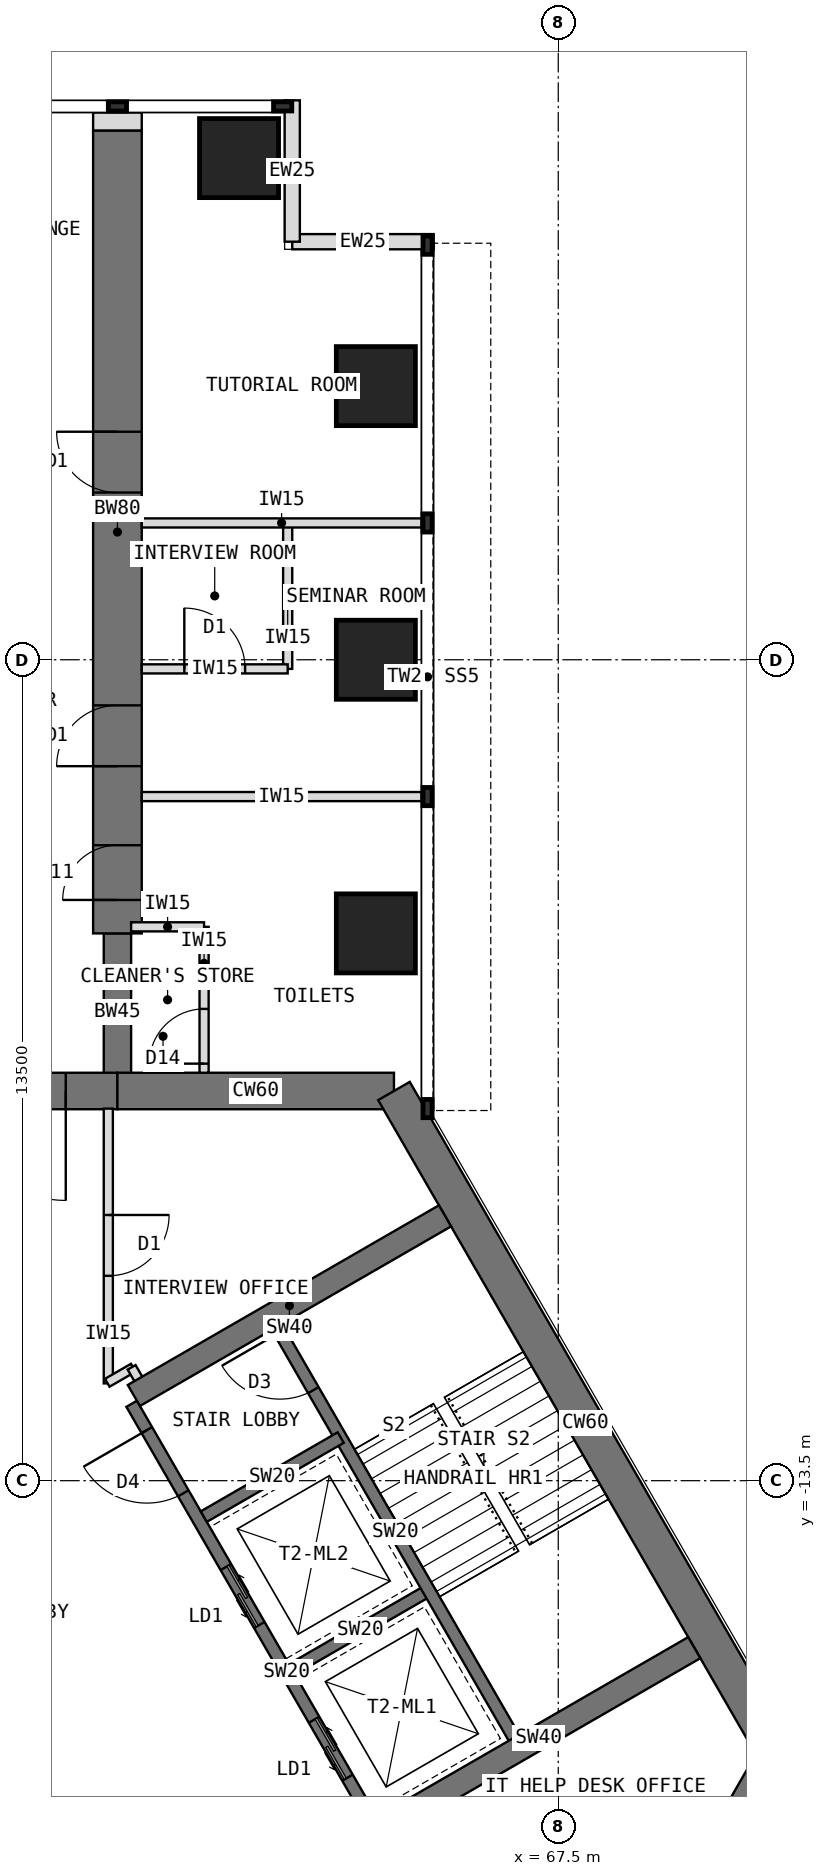
"""IFC4 building model, lengths in metres.
Left out: names, types, materials, properties, quantities, classifications, styles, units other than length and angle.
Written with IfcOpenShell. Run it as: python <this file> out.ifc"""

import sys

from ifc_helpers import new_model, si_unit, direction, frame, frame_2d, origin, origin_2d, place, context, subcontext, project, spatial, rectangle, extrude, element, fill, save


model = new_model("IFC4")
c1 = context("Model", 3, precision=1e-05, world=origin(), true_north=direction((0.0, 1.0)))
c2 = subcontext(c1, "Body", "Model", "MODEL_VIEW")
j1 = project(units=[si_unit("LENGTHUNIT", "METRE"), si_unit("PLANEANGLEUNIT", "RADIAN")], contexts=[c1])
p1 = place(None, origin())
s1 = spatial("IfcSite", under=j1, at=p1, CompositionType="ELEMENT")
p2 = place(p1, origin())
s2 = spatial("IfcBuilding", under=s1, at=p2, CompositionType="ELEMENT")
p3 = place(p2, frame((0.0, 0.0, 121.5)))
s3 = spatial("IfcBuildingStorey", under=s2, at=p3, CompositionType="ELEMENT", Elevation=121.5)
p4 = place(p3, frame((64.798, -7.092, 0.0), z_axis=(0.0, 0.0, 1.0), x_axis=(-1.0, 0.0, 0.0)))
e1 = element("IfcWall", 1, at=p4, inside=s3, PredefinedType="SHEAR", context=c2, shape_type="SweptSolid", body=[
    extrude(rectangle(XDim=4.548, YDim=0.6, at=frame_2d((2.274, 0.0))), origin(), (0.0, 0.0, 1.0), 4.0),
])
p5 = place(p3, frame((60.25, -7.092, 0.0), z_axis=(0.0, 0.0, 1.0), x_axis=(-1.0, 0.0, 0.0)))
e2 = element("IfcWall", 2, at=p5, inside=s3, PredefinedType="SHEAR", context=c2, shape_type="SweptSolid", body=[
    extrude(rectangle(XDim=3.5, YDim=0.6, at=frame_2d((1.75, 0.0))), origin(), (0.0, 0.0, 1.0), 4.0),
])
p6 = place(p5, frame((0.85, 0.0, 0.0)))
e3 = element("IfcOpeningElement", 3, at=p6, cuts=e2, PredefinedType="OPENING", context=c2, shape_type="SweptSolid", body=[
    extrude(rectangle(XDim=1.8, YDim=2.1, at=frame_2d((0.9, 1.05))), frame((0.0, 0.31, 0.0), z_axis=(0.0, -1.0, 0.0), x_axis=(1.0, 0.0, 0.0)), (0.0, 0.0, 1.0), 0.62),
])
p7 = place(p3, frame((68.822, -21.939, 0.0), z_axis=(0.0, 0.0, 1.0), x_axis=(0.500024481964, 0.866011268655, 0.0)))
e4 = element("IfcWall", 4, at=p7, inside=s3, PredefinedType="SHEAR", context=c2, shape_type="SweptSolid", body=[
    extrude(rectangle(XDim=4.548, YDim=0.6, at=frame_2d((2.274, 0.0))), origin(), (0.0, 0.0, 1.0), 4.0),
])
p8 = place(p3, frame((71.096, -18.0, 0.0), z_axis=(0.0, 0.0, 1.0), x_axis=(-0.500005998175, 0.866021940709, 0.0)))
e5 = element("IfcWall", 5, at=p8, inside=s3, PredefinedType="SHEAR", context=c2, shape_type="SweptSolid", body=[
    extrude(rectangle(XDim=12.596, YDim=0.6, at=frame_2d((6.298, 0.0))), origin(), (0.0, 0.0, 1.0), 4.0),
])
p9 = place(p3, frame((60.25, -7.092, 0.0), z_axis=(0.0, 0.0, 1.0), x_axis=(0.0, 1.0, 0.0)))
e6 = element("IfcWall", 6, at=p9, inside=s3, PredefinedType="SHEAR", context=c2, shape_type="SweptSolid", body=[
    extrude(rectangle(XDim=2.592, YDim=0.45, at=frame_2d((1.296, 0.0))), origin(), (0.0, 0.0, 1.0), 4.0),
])
p10 = place(p3, frame((60.25, -4.5, 0.0), z_axis=(0.0, 0.0, 1.0), x_axis=(0.0, 1.0, 0.0)))
e7 = element("IfcWall", 7, at=p10, inside=s3, PredefinedType="SHEAR", context=c2, shape_type="SweptSolid", body=[
    extrude(rectangle(XDim=13.2, YDim=0.8, at=frame_2d((6.6, 0.0))), origin(), (0.0, 0.0, 1.0), 4.0),
])
p11 = place(p10, frame((0.55, 0.0, 0.0)))
e8 = element("IfcOpeningElement", 8, at=p11, cuts=e7, PredefinedType="OPENING", context=c2, shape_type="SweptSolid", body=[
    extrude(rectangle(XDim=0.9, YDim=2.1, at=frame_2d((0.45, 1.05))), frame((0.0, 0.41, 0.0), z_axis=(0.0, -1.0, 0.0), x_axis=(1.0, 0.0, 0.0)), (0.0, 0.0, 1.0), 0.82),
])
p12 = place(p10, frame((2.75, 0.0, 0.0)))
e9 = element("IfcOpeningElement", 9, at=p12, cuts=e7, PredefinedType="OPENING", context=c2, shape_type="SweptSolid", body=[
    extrude(rectangle(XDim=1.0, YDim=2.1, at=frame_2d((0.5, 1.05))), frame((0.0, 0.41, 0.0), z_axis=(0.0, -1.0, 0.0), x_axis=(1.0, 0.0, 0.0)), (0.0, 0.0, 1.0), 0.82),
])
p13 = place(p10, frame((7.25, 0.0, 0.0)))
e10 = element("IfcOpeningElement", 10, at=p13, cuts=e7, PredefinedType="OPENING", context=c2, shape_type="SweptSolid", body=[
    extrude(rectangle(XDim=1.0, YDim=2.1, at=frame_2d((0.5, 1.05))), frame((0.0, 0.41, 0.0), z_axis=(0.0, -1.0, 0.0), x_axis=(1.0, 0.0, 0.0)), (0.0, 0.0, 1.0), 0.82),
])
for number, where, z_axis, x_axis in (
    (11, (64.5, -4.5, 0.0), (0.0, 0.0, 1.0), (1.0, 0.0, 0.0)),
    (12, (64.5, 0.0, 0.0), (0.0, 0.0, 1.0), (1.0, 0.0, 0.0)),
    (13, (64.5, 4.5, 0.0), (0.0, 0.0, 1.0), (1.0, 0.0, 0.0)),
    (14, (62.25, 8.25, 0.0), (0.0, 0.0, 1.0), (1.0, 0.0, 0.0)),
):
    element("IfcColumn", number, at=place(p3, frame(where, z_axis=z_axis, x_axis=x_axis)), inside=s3, PredefinedType="COLUMN", context=c2, shape_type="SweptSolid", body=[
        extrude(rectangle(XDim=1.3, YDim=1.3, at=origin_2d()), origin(), (0.0, 0.0, 1.0), 4.0),
    ])
for number, where, z_axis, x_axis in (
    (15, (65.45, 6.875, 0.0), (0.0, 0.0, 1.0), (-1.0, 0.0, 0.0)),
    (16, (63.125, 6.875, 0.0), (0.0, 0.0, 1.0), (0.0, 1.0, 0.0)),
):
    element("IfcWall", number, at=place(p3, frame(where, z_axis=z_axis, x_axis=x_axis)), inside=s3, PredefinedType="STANDARD", context=c2, shape_type="SweptSolid", body=[
        extrude(rectangle(XDim=2.325, YDim=0.25, at=frame_2d((1.163, 0.0))), origin(), (0.0, 0.0, 1.0), 3.8),
    ])
p14 = place(p3, frame((60.25, 8.7, 0.0), z_axis=(0.0, 0.0, 1.0), x_axis=(0.0, 1.0, 0.0)))
e17 = element("IfcWall", 17, at=p14, inside=s3, PredefinedType="PARTITIONING", context=c2, shape_type="SweptSolid", body=[
    extrude(rectangle(XDim=0.3, YDim=0.8, at=frame_2d((0.15, 0.0))), origin(), (0.0, 0.0, 1.0), 3.8),
])
p15 = place(p3, frame((64.484, -19.164, 0.0), z_axis=(0.0, 0.0, 1.0), x_axis=(-0.49999894854, 0.866026010844, 0.0)))
e18 = element("IfcWall", 18, at=p15, inside=s3, PredefinedType="SHEAR", context=c2, shape_type="SweptSolid", body=[
    extrude(rectangle(XDim=8.0, YDim=0.2, at=frame_2d((4.0, 0.0))), origin(), (0.0, 0.0, 1.0), 4.0),
])
p16 = place(p15, frame((6.3, 0.0, 0.0)))
e19 = element("IfcOpeningElement", 19, at=p16, cuts=e18, PredefinedType="OPENING", context=c2, shape_type="SweptSolid", body=[
    extrude(rectangle(XDim=1.2, YDim=2.1, at=frame_2d((0.6, 1.05))), frame((0.0, 0.11, 0.0), z_axis=(0.0, -1.0, 0.0), x_axis=(1.0, 0.0, 0.0)), (0.0, 0.0, 1.0), 0.22),
])
p17 = place(p15, frame((0.9, 0.0, 0.0)))
e20 = element("IfcOpeningElement", 20, at=p17, cuts=e18, PredefinedType="OPENING", context=c2, shape_type="SweptSolid", body=[
    extrude(rectangle(XDim=1.1, YDim=2.2, at=frame_2d((0.55, 1.1))), frame((0.0, 0.11, 0.0), z_axis=(0.0, -1.0, 0.0), x_axis=(1.0, 0.0, 0.0)), (0.0, 0.0, 1.0), 0.22),
])
p18 = place(p15, frame((3.8, 0.0, 0.0)))
e21 = element("IfcOpeningElement", 21, at=p18, cuts=e18, PredefinedType="OPENING", context=c2, shape_type="SweptSolid", body=[
    extrude(rectangle(XDim=1.1, YDim=2.2, at=frame_2d((0.55, 1.1))), frame((0.0, 0.11, 0.0), z_axis=(0.0, -1.0, 0.0), x_axis=(1.0, 0.0, 0.0)), (0.0, 0.0, 1.0), 0.22),
])
p19 = place(p3, frame((63.12, -16.603, 0.0), z_axis=(0.0, 0.0, 1.0), x_axis=(0.866062058628, 0.499936506574, 0.0)))
e22 = element("IfcWall", 22, at=p19, inside=s3, PredefinedType="SHEAR", context=c2, shape_type="SweptSolid", body=[
    extrude(rectangle(XDim=2.6, YDim=0.2, at=frame_2d((1.3, 0.0))), origin(), (0.0, 0.0, 1.0), 4.0),
])
p20 = place(p3, frame((61.67, -14.091, 0.0), z_axis=(0.0, 0.0, 1.0), x_axis=(0.86603858612, 0.49997716683, 0.0)))
e23 = element("IfcWall", 23, at=p20, inside=s3, PredefinedType="SHEAR", context=c2, shape_type="SweptSolid", body=[
    extrude(rectangle(XDim=2.6, YDim=0.2, at=frame_2d((1.3, 0.0))), origin(), (0.0, 0.0, 1.0), 4.0),
])
p21 = place(p3, frame((66.822, -17.814, 0.0), z_axis=(0.0, 0.0, 1.0), x_axis=(-0.49999894854, 0.866026010844, 0.0)))
e24 = element("IfcWall", 24, at=p21, inside=s3, PredefinedType="SHEAR", context=c2, shape_type="SweptSolid", body=[
    extrude(rectangle(XDim=8.0, YDim=0.2, at=frame_2d((4.0, 0.0))), origin(), (0.0, 0.0, 1.0), 4.0),
])
p22 = place(p21, frame((6.7, 0.0, 0.0)))
e25 = element("IfcOpeningElement", 25, at=p22, cuts=e24, PredefinedType="OPENING", context=c2, shape_type="SweptSolid", body=[
    extrude(rectangle(XDim=1.1, YDim=2.1, at=frame_2d((0.55, 1.05))), frame((0.0, 0.11, 0.0), z_axis=(0.0, -1.0, 0.0), x_axis=(1.0, 0.0, 0.0)), (0.0, 0.0, 1.0), 0.22),
])
p23 = place(p3, frame((60.52, -12.099, 0.0), z_axis=(0.0, 0.0, 1.0), x_axis=(0.866009424208, 0.500027676417, 0.0)))
e26 = element("IfcWall", 26, at=p23, inside=s3, PredefinedType="SHEAR", context=c2, shape_type="SweptSolid", body=[
    extrude(rectangle(XDim=5.908, YDim=0.4, at=frame_2d((2.954, 0.0))), origin(), (0.0, 0.0, 1.0), 4.0),
])
p24 = place(p3, frame((64.62, -19.201, 0.0), z_axis=(0.0, 0.0, 1.0), x_axis=(0.866027317282, 0.49999668571, 0.0)))
e27 = element("IfcWall", 27, at=p24, inside=s3, PredefinedType="SHEAR", context=c2, shape_type="SweptSolid", body=[
    extrude(rectangle(XDim=5.908, YDim=0.4, at=frame_2d((2.954, 0.0))), origin(), (0.0, 0.0, 1.0), 4.0),
])
for number, where, z_axis, x_axis in (
    (28, (60.65, -2.25, 0.0), (0.0, 0.0, 1.0), (1.0, 0.0, 0.0)),
    (29, (60.65, 2.25, 0.0), (0.0, 0.0, 1.0), (1.0, 0.0, 0.0)),
):
    element("IfcWall", number, at=place(p3, frame(where, z_axis=z_axis, x_axis=x_axis)), inside=s3, PredefinedType="PARTITIONING", context=c2, shape_type="SweptSolid", body=[
        extrude(rectangle(XDim=4.6, YDim=0.15, at=frame_2d((2.3, 0.0))), origin(), (0.0, 0.0, 1.0), 3.8),
    ])
p25 = place(p3, frame((63.05, -0.15, 0.0), z_axis=(0.0, 0.0, 1.0), x_axis=(0.0, 1.0, 0.0)))
e30 = element("IfcWall", 30, at=p25, inside=s3, PredefinedType="PARTITIONING", context=c2, shape_type="SweptSolid", body=[
    extrude(rectangle(XDim=2.4, YDim=0.15, at=frame_2d((1.2, 0.0))), origin(), (0.0, 0.0, 1.0), 3.8),
])
p26 = place(p3, frame((60.65, -0.15, 0.0), z_axis=(0.0, 0.0, 1.0), x_axis=(1.0, 0.0, 0.0)))
e31 = element("IfcWall", 31, at=p26, inside=s3, PredefinedType="PARTITIONING", context=c2, shape_type="SweptSolid", body=[
    extrude(rectangle(XDim=2.4, YDim=0.15, at=frame_2d((1.2, 0.0))), origin(), (0.0, 0.0, 1.0), 3.8),
])
p27 = place(p26, frame((0.7, 0.0, 0.0)))
e32 = element("IfcOpeningElement", 32, at=p27, cuts=e31, PredefinedType="OPENING", context=c2, shape_type="SweptSolid", body=[
    extrude(rectangle(XDim=1.0, YDim=2.1, at=frame_2d((0.5, 1.05))), frame((0.0, 0.085, 0.0), z_axis=(0.0, -1.0, 0.0), x_axis=(1.0, 0.0, 0.0)), (0.0, 0.0, 1.0), 0.17),
])
p28 = place(p3, frame((61.675, -6.792, 0.0), z_axis=(0.0, 0.0, 1.0), x_axis=(0.0, 1.0, 0.0)))
e33 = element("IfcWall", 33, at=p28, inside=s3, PredefinedType="PARTITIONING", context=c2, shape_type="SweptSolid", body=[
    extrude(rectangle(XDim=2.4, YDim=0.15, at=frame_2d((1.2, 0.0))), origin(), (0.0, 0.0, 1.0), 3.8),
])
p29 = place(p28, frame((0.15, 0.0, 0.0)))
e34 = element("IfcOpeningElement", 34, at=p29, cuts=e33, PredefinedType="OPENING", context=c2, shape_type="SweptSolid", body=[
    extrude(rectangle(XDim=0.9, YDim=2.1, at=frame_2d((0.45, 1.05))), frame((0.0, 0.085, 0.0), z_axis=(0.0, -1.0, 0.0), x_axis=(1.0, 0.0, 0.0)), (0.0, 0.0, 1.0), 0.17),
])
p30 = place(p3, frame((60.475, -4.392, 0.0), z_axis=(0.0, 0.0, 1.0), x_axis=(1.0, 0.0, 0.0)))
e35 = element("IfcWall", 35, at=p30, inside=s3, PredefinedType="PARTITIONING", context=c2, shape_type="SweptSolid", body=[
    extrude(rectangle(XDim=1.2, YDim=0.15, at=frame_2d((0.6, 0.0))), origin(), (0.0, 0.0, 1.0), 3.8),
])
p31 = place(p3, frame((60.1, -7.382, 0.0), z_axis=(0.0, 0.0, 1.0), x_axis=(0.0, -1.0, 0.0)))
e36 = element("IfcWall", 36, at=p31, inside=s3, PredefinedType="PARTITIONING", context=c2, shape_type="SweptSolid", body=[
    extrude(rectangle(XDim=4.519, YDim=0.15, at=frame_2d((2.259, 0.0))), origin(), (0.0, 0.0, 1.0), 3.8),
])
p32 = place(p31, frame((1.749, 0.0, 0.0)))
e37 = element("IfcOpeningElement", 37, at=p32, cuts=e36, PredefinedType="OPENING", context=c2, shape_type="SweptSolid", body=[
    extrude(rectangle(XDim=1.0, YDim=2.1, at=frame_2d((0.5, 1.05))), frame((0.0, 0.085, 0.0), z_axis=(0.0, -1.0, 0.0), x_axis=(1.0, 0.0, 0.0)), (0.0, 0.0, 1.0), 0.17),
])
p33 = place(p3, frame((60.083, -11.89, 0.0), z_axis=(0.0, 0.0, 1.0), x_axis=(0.865831790172, 0.50033519877, 0.0)))
e38 = element("IfcWall", 38, at=p33, inside=s3, PredefinedType="PARTITIONING", context=c2, shape_type="SweptSolid", body=[
    extrude(rectangle(XDim=0.494, YDim=0.15, at=frame_2d((0.247, 0.0))), origin(), (0.0, 0.0, 1.0), 3.8),
])
p34 = place(p3, frame((60.483, -11.635, 0.0), z_axis=(0.0, 0.0, 1.0), x_axis=(0.500230298122, -0.865892400268, 0.0)))
e39 = element("IfcWall", 39, at=p34, inside=s3, PredefinedType="PARTITIONING", context=c2, shape_type="SweptSolid", body=[
    extrude(rectangle(XDim=0.43, YDim=0.15, at=frame_2d((0.215, 0.0))), origin(), (0.0, 0.0, 1.0), 3.8),
])
p35 = place(p16, origin())
e40 = element("IfcDoor", 40, at=p35, inside=s3, OperationType="SINGLE_SWING_RIGHT", PredefinedType="DOOR", context=c2, shape_type="SweptSolid", body=[
    extrude(rectangle(XDim=1.2, YDim=2.1, at=frame_2d((0.6, 1.05))), frame((0.0, 0.025, 0.0), z_axis=(0.0, -1.0, 0.0), x_axis=(1.0, 0.0, 0.0)), (0.0, 0.0, 1.0), 0.05),
])
fill(e19, e40)
p36 = place(p17, origin())
e41 = element("IfcDoor", 41, at=p36, inside=s3, OperationType="DOUBLE_DOOR_SLIDING", PredefinedType="DOOR", context=c2, shape_type="SweptSolid", body=[
    extrude(rectangle(XDim=1.1, YDim=2.2, at=frame_2d((0.55, 1.1))), frame((0.0, 0.025, 0.0), z_axis=(0.0, -1.0, 0.0), x_axis=(1.0, 0.0, 0.0)), (0.0, 0.0, 1.0), 0.05),
])
fill(e20, e41)
p37 = place(p18, origin())
e42 = element("IfcDoor", 42, at=p37, inside=s3, OperationType="DOUBLE_DOOR_SLIDING", PredefinedType="DOOR", context=c2, shape_type="SweptSolid", body=[
    extrude(rectangle(XDim=1.1, YDim=2.2, at=frame_2d((0.55, 1.1))), frame((0.0, 0.025, 0.0), z_axis=(0.0, -1.0, 0.0), x_axis=(1.0, 0.0, 0.0)), (0.0, 0.0, 1.0), 0.05),
])
fill(e21, e42)
p38 = place(p22, origin())
e43 = element("IfcDoor", 43, at=p38, inside=s3, OperationType="SINGLE_SWING_RIGHT", PredefinedType="DOOR", context=c2, shape_type="SweptSolid", body=[
    extrude(rectangle(XDim=1.1, YDim=2.1, at=frame_2d((0.55, 1.05))), frame((0.0, 0.025, 0.0), z_axis=(0.0, -1.0, 0.0), x_axis=(1.0, 0.0, 0.0)), (0.0, 0.0, 1.0), 0.05),
])
fill(e25, e43)
p39 = place(p6, origin())
e44 = element("IfcDoor", 44, at=p39, inside=s3, OperationType="DOUBLE_DOOR_DOUBLE_SWING", PredefinedType="DOOR", context=c2, shape_type="SweptSolid", body=[
    extrude(rectangle(XDim=1.72, YDim=2.06, at=frame_2d((0.9, 1.03))), frame((0.0, 0.025, 0.0), z_axis=(0.0, -1.0, 0.0), x_axis=(1.0, 0.0, 0.0)), (0.0, 0.0, 1.0), 0.05),
    extrude(rectangle(XDim=0.04, YDim=2.1, at=frame_2d((0.02, 1.05))), frame((0.0, 0.3, 0.0), z_axis=(0.0, -1.0, 0.0), x_axis=(1.0, 0.0, 0.0)), (0.0, 0.0, 1.0), 0.6),
    extrude(rectangle(XDim=0.04, YDim=2.1, at=frame_2d((1.78, 1.05))), frame((0.0, 0.3, 0.0), z_axis=(0.0, -1.0, 0.0), x_axis=(1.0, 0.0, 0.0)), (0.0, 0.0, 1.0), 0.6),
    extrude(rectangle(XDim=1.72, YDim=0.04, at=frame_2d((0.9, 2.08))), frame((0.0, 0.3, 0.0), z_axis=(0.0, -1.0, 0.0), x_axis=(1.0, 0.0, 0.0)), (0.0, 0.0, 1.0), 0.6),
])
fill(e3, e44)
p40 = place(p27, origin())
e45 = element("IfcDoor", 45, at=p40, inside=s3, OperationType="SINGLE_SWING_LEFT", PredefinedType="DOOR", context=c2, shape_type="SweptSolid", body=[
    extrude(rectangle(XDim=1.0, YDim=2.1, at=frame_2d((0.5, 1.05))), frame((0.0, 0.025, 0.0), z_axis=(0.0, -1.0, 0.0), x_axis=(1.0, 0.0, 0.0)), (0.0, 0.0, 1.0), 0.05),
])
fill(e32, e45)
p41 = place(p29, origin())
e46 = element("IfcDoor", 46, at=p41, inside=s3, OperationType="SINGLE_SWING_LEFT", PredefinedType="DOOR", context=c2, shape_type="SweptSolid", body=[
    extrude(rectangle(XDim=0.9, YDim=2.1, at=frame_2d((0.45, 1.05))), frame((0.0, 0.025, 0.0), z_axis=(0.0, -1.0, 0.0), x_axis=(1.0, 0.0, 0.0)), (0.0, 0.0, 1.0), 0.05),
])
fill(e34, e46)
p42 = place(p32, origin())
e47 = element("IfcDoor", 47, at=p42, inside=s3, OperationType="SINGLE_SWING_LEFT", PredefinedType="DOOR", context=c2, shape_type="SweptSolid", body=[
    extrude(rectangle(XDim=1.0, YDim=2.1, at=frame_2d((0.5, 1.05))), frame((0.0, 0.025, 0.0), z_axis=(0.0, -1.0, 0.0), x_axis=(1.0, 0.0, 0.0)), (0.0, 0.0, 1.0), 0.05),
])
fill(e37, e47)
p43 = place(p11, origin())
e48 = element("IfcDoor", 48, at=p43, inside=s3, OperationType="SINGLE_SWING_LEFT", PredefinedType="DOOR", context=c2, shape_type="SweptSolid", body=[
    extrude(rectangle(XDim=0.82, YDim=2.06, at=frame_2d((0.45, 1.03))), frame((0.0, 0.025, 0.0), z_axis=(0.0, -1.0, 0.0), x_axis=(1.0, 0.0, 0.0)), (0.0, 0.0, 1.0), 0.05),
    extrude(rectangle(XDim=0.04, YDim=2.1, at=frame_2d((0.02, 1.05))), frame((0.0, 0.4, 0.0), z_axis=(0.0, -1.0, 0.0), x_axis=(1.0, 0.0, 0.0)), (0.0, 0.0, 1.0), 0.8),
    extrude(rectangle(XDim=0.04, YDim=2.1, at=frame_2d((0.88, 1.05))), frame((0.0, 0.4, 0.0), z_axis=(0.0, -1.0, 0.0), x_axis=(1.0, 0.0, 0.0)), (0.0, 0.0, 1.0), 0.8),
    extrude(rectangle(XDim=0.82, YDim=0.04, at=frame_2d((0.45, 2.08))), frame((0.0, 0.4, 0.0), z_axis=(0.0, -1.0, 0.0), x_axis=(1.0, 0.0, 0.0)), (0.0, 0.0, 1.0), 0.8),
])
fill(e8, e48)
p44 = place(p12, origin())
e49 = element("IfcDoor", 49, at=p44, inside=s3, OperationType="SINGLE_SWING_LEFT", PredefinedType="DOOR", context=c2, shape_type="SweptSolid", body=[
    extrude(rectangle(XDim=0.92, YDim=2.06, at=frame_2d((0.5, 1.03))), frame((0.0, 0.025, 0.0), z_axis=(0.0, -1.0, 0.0), x_axis=(1.0, 0.0, 0.0)), (0.0, 0.0, 1.0), 0.05),
    extrude(rectangle(XDim=0.04, YDim=2.1, at=frame_2d((0.02, 1.05))), frame((0.0, 0.4, 0.0), z_axis=(0.0, -1.0, 0.0), x_axis=(1.0, 0.0, 0.0)), (0.0, 0.0, 1.0), 0.8),
    extrude(rectangle(XDim=0.04, YDim=2.1, at=frame_2d((0.98, 1.05))), frame((0.0, 0.4, 0.0), z_axis=(0.0, -1.0, 0.0), x_axis=(1.0, 0.0, 0.0)), (0.0, 0.0, 1.0), 0.8),
    extrude(rectangle(XDim=0.92, YDim=0.04, at=frame_2d((0.5, 2.08))), frame((0.0, 0.4, 0.0), z_axis=(0.0, -1.0, 0.0), x_axis=(1.0, 0.0, 0.0)), (0.0, 0.0, 1.0), 0.8),
])
fill(e9, e49)
p45 = place(p13, origin())
e50 = element("IfcDoor", 50, at=p45, inside=s3, OperationType="SINGLE_SWING_RIGHT", PredefinedType="DOOR", context=c2, shape_type="SweptSolid", body=[
    extrude(rectangle(XDim=0.92, YDim=2.06, at=frame_2d((0.5, 1.03))), frame((0.0, 0.025, 0.0), z_axis=(0.0, -1.0, 0.0), x_axis=(1.0, 0.0, 0.0)), (0.0, 0.0, 1.0), 0.05),
    extrude(rectangle(XDim=0.04, YDim=2.1, at=frame_2d((0.02, 1.05))), frame((0.0, 0.4, 0.0), z_axis=(0.0, -1.0, 0.0), x_axis=(1.0, 0.0, 0.0)), (0.0, 0.0, 1.0), 0.8),
    extrude(rectangle(XDim=0.04, YDim=2.1, at=frame_2d((0.98, 1.05))), frame((0.0, 0.4, 0.0), z_axis=(0.0, -1.0, 0.0), x_axis=(1.0, 0.0, 0.0)), (0.0, 0.0, 1.0), 0.8),
    extrude(rectangle(XDim=0.92, YDim=0.04, at=frame_2d((0.5, 2.08))), frame((0.0, 0.4, 0.0), z_axis=(0.0, -1.0, 0.0), x_axis=(1.0, 0.0, 0.0)), (0.0, 0.0, 1.0), 0.8),
])
fill(e10, e50)
save(model, sys.argv[1])
